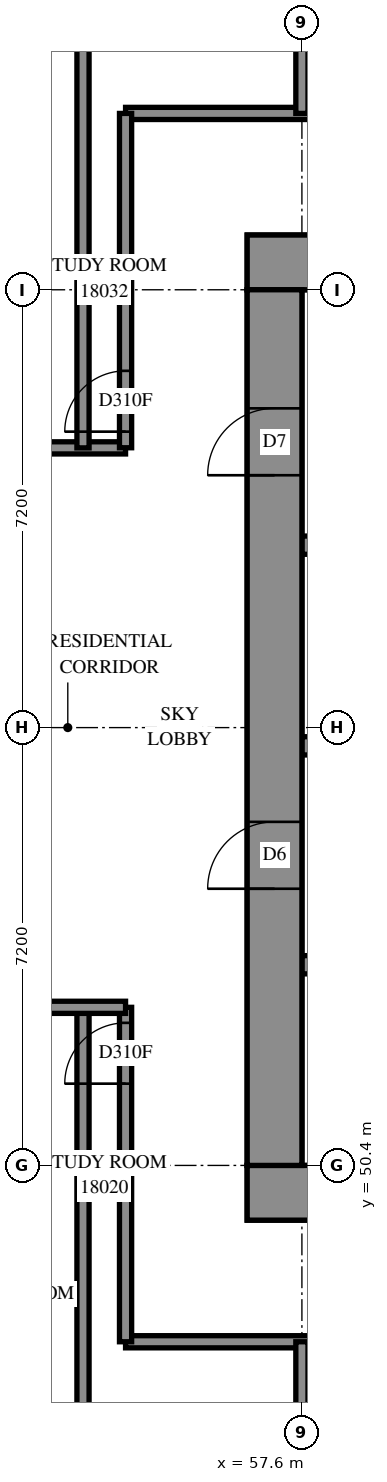
"""IFC4 building model, lengths in metres.
Left out: names, types, materials, properties, quantities, classifications, styles, units other than length and angle.
Written with IfcOpenShell. Run it as: python <this file> out.ifc"""

import sys

from ifc_helpers import new_model, si_unit, direction, frame, frame_2d, origin, place, context, subcontext, project, spatial, rectangle, extrude, element, fill, save


model = new_model("IFC4")
c1 = context("Model", 3, precision=1e-05, world=origin(), true_north=direction((0.0, 1.0)))
c2 = subcontext(c1, "Body", "Model", "MODEL_VIEW")
j1 = project(units=[si_unit("LENGTHUNIT", "METRE"), si_unit("PLANEANGLEUNIT", "RADIAN")], contexts=[c1])
p1 = place(None, origin())
s1 = spatial("IfcSite", under=j1, at=p1, CompositionType="ELEMENT")
p2 = place(p1, origin())
s2 = spatial("IfcBuilding", under=s1, at=p2, CompositionType="ELEMENT")
p3 = place(p2, frame((0.0, 0.0, 67.8)))
s3 = spatial("IfcBuildingStorey", under=s2, at=p3, CompositionType="ELEMENT", Elevation=67.8)
p4 = place(p3, frame((56.7, 49.95, -0.3), z_axis=(0.0, 0.0, 1.0), x_axis=(1.0, 0.0, 0.0)))
e1 = element("IfcWall", 1, at=p4, inside=s3, PredefinedType="SHEAR", context=c2, shape_type="SweptSolid", body=[
    extrude(rectangle(XDim=16.2, YDim=0.9, at=frame_2d((8.1, 0.0))), origin(), (0.0, 0.0, 1.0), 3.5),
])
p5 = place(p3, frame((56.7, 65.25, -0.3), z_axis=(0.0, 0.0, 1.0), x_axis=(1.0, 0.0, 0.0)))
e2 = element("IfcWall", 2, at=p5, inside=s3, PredefinedType="SHEAR", context=c2, shape_type="SweptSolid", body=[
    extrude(rectangle(XDim=16.2, YDim=0.9, at=frame_2d((8.1, 0.0))), origin(), (0.0, 0.0, 1.0), 3.5),
])
p6 = place(p5, frame((10.9, 0.0, 0.3)))
e3 = element("IfcOpeningElement", 3, at=p6, cuts=e2, PredefinedType="OPENING", context=c2, shape_type="SweptSolid", body=[
    extrude(rectangle(XDim=0.8, YDim=2.1, at=frame_2d((0.4, 1.05))), frame((0.0, 0.46, 0.0), z_axis=(0.0, -1.0, 0.0), x_axis=(1.0, 0.0, 0.0)), (0.0, 0.0, 1.0), 0.92),
])
p7 = place(p3, frame((57.15, 50.4, -0.3), z_axis=(0.0, 0.0, 1.0), x_axis=(0.0, 1.0, 0.0)))
e4 = element("IfcWall", 4, at=p7, inside=s3, PredefinedType="SHEAR", context=c2, shape_type="SweptSolid", body=[
    extrude(rectangle(XDim=14.4, YDim=0.9, at=frame_2d((7.2, 0.0))), origin(), (0.0, 0.0, 1.0), 3.5),
])
p8 = place(p7, frame((4.55, 0.0, 0.3)))
e5 = element("IfcOpeningElement", 5, at=p8, cuts=e4, PredefinedType="OPENING", context=c2, shape_type="SweptSolid", body=[
    extrude(rectangle(XDim=1.1, YDim=2.1, at=frame_2d((0.55, 1.05))), frame((0.0, 0.46, 0.0), z_axis=(0.0, -1.0, 0.0), x_axis=(1.0, 0.0, 0.0)), (0.0, 0.0, 1.0), 0.92),
])
p9 = place(p7, frame((11.35, 0.0, 0.3)))
e6 = element("IfcOpeningElement", 6, at=p9, cuts=e4, PredefinedType="OPENING", context=c2, shape_type="SweptSolid", body=[
    extrude(rectangle(XDim=1.1, YDim=2.1, at=frame_2d((0.55, 1.05))), frame((0.0, 0.46, 0.0), z_axis=(0.0, -1.0, 0.0), x_axis=(1.0, 0.0, 0.0)), (0.0, 0.0, 1.0), 0.92),
])
p10 = place(p3, frame((57.6, 53.7, 0.0), z_axis=(0.0, 0.0, 1.0), x_axis=(1.0, 0.0, 0.0)))
e7 = element("IfcWall", 7, at=p10, inside=s3, PredefinedType="SOLIDWALL", context=c2, shape_type="SweptSolid", body=[
    extrude(rectangle(XDim=14.4, YDim=0.3, at=frame_2d((7.2, 0.0))), origin(), (0.0, 0.0, 1.0), 3.9),
])
p11 = place(p10, frame((1.25, 0.0, 0.0)))
e8 = element("IfcOpeningElement", 8, at=p11, cuts=e7, PredefinedType="OPENING", context=c2, shape_type="SweptSolid", body=[
    extrude(rectangle(XDim=1.1, YDim=2.1, at=frame_2d((0.55, 1.05))), frame((0.0, 0.16, 0.0), z_axis=(0.0, -1.0, 0.0), x_axis=(1.0, 0.0, 0.0)), (0.0, 0.0, 1.0), 0.32),
])
p12 = place(p10, frame((4.85, 0.0, 0.0)))
e9 = element("IfcOpeningElement", 9, at=p12, cuts=e7, PredefinedType="OPENING", context=c2, shape_type="SweptSolid", body=[
    extrude(rectangle(XDim=1.1, YDim=2.1, at=frame_2d((0.55, 1.05))), frame((0.0, 0.16, 0.0), z_axis=(0.0, -1.0, 0.0), x_axis=(1.0, 0.0, 0.0)), (0.0, 0.0, 1.0), 0.32),
])
p13 = place(p10, frame((8.45, 0.0, 0.0)))
e10 = element("IfcOpeningElement", 10, at=p13, cuts=e7, PredefinedType="OPENING", context=c2, shape_type="SweptSolid", body=[
    extrude(rectangle(XDim=1.1, YDim=2.1, at=frame_2d((0.55, 1.05))), frame((0.0, 0.16, 0.0), z_axis=(0.0, -1.0, 0.0), x_axis=(1.0, 0.0, 0.0)), (0.0, 0.0, 1.0), 0.32),
])
p14 = place(p10, frame((12.05, 0.0, 0.0)))
e11 = element("IfcOpeningElement", 11, at=p14, cuts=e7, PredefinedType="OPENING", context=c2, shape_type="SweptSolid", body=[
    extrude(rectangle(XDim=1.1, YDim=2.1, at=frame_2d((0.55, 1.05))), frame((0.0, 0.16, 0.0), z_axis=(0.0, -1.0, 0.0), x_axis=(1.0, 0.0, 0.0)), (0.0, 0.0, 1.0), 0.32),
])
p15 = place(p3, frame((57.6, 57.3, 0.0), z_axis=(0.0, 0.0, 1.0), x_axis=(1.0, 0.0, 0.0)))
e12 = element("IfcWall", 12, at=p15, inside=s3, PredefinedType="SOLIDWALL", context=c2, shape_type="SweptSolid", body=[
    extrude(rectangle(XDim=14.4, YDim=0.3, at=frame_2d((7.2, 0.0))), origin(), (0.0, 0.0, 1.0), 3.9),
])
p16 = place(p15, frame((12.05, 0.0, 0.0)))
e13 = element("IfcOpeningElement", 13, at=p16, cuts=e12, PredefinedType="OPENING", context=c2, shape_type="SweptSolid", body=[
    extrude(rectangle(XDim=1.1, YDim=2.1, at=frame_2d((0.55, 1.05))), frame((0.0, 0.16, 0.0), z_axis=(0.0, -1.0, 0.0), x_axis=(1.0, 0.0, 0.0)), (0.0, 0.0, 1.0), 0.32),
])
p17 = place(p3, frame((57.6, 60.6, 0.0), z_axis=(0.0, 0.0, 1.0), x_axis=(1.0, 0.0, 0.0)))
e14 = element("IfcWall", 14, at=p17, inside=s3, PredefinedType="SOLIDWALL", context=c2, shape_type="SweptSolid", body=[
    extrude(rectangle(XDim=7.2, YDim=0.3, at=frame_2d((3.6, 0.0))), origin(), (0.0, 0.0, 1.0), 3.9),
])
p18 = place(p3, frame((33.4, 62.2, 0.0), z_axis=(0.0, 0.0, 1.0), x_axis=(1.0, 0.0, 0.0)))
e15 = element("IfcWall", 15, at=p18, inside=s3, PredefinedType="PARTITIONING", context=c2, shape_type="SweptSolid", body=[
    extrude(rectangle(XDim=21.3, YDim=0.2, at=frame_2d((10.65, 0.0))), origin(), (0.0, 0.0, 1.0), 3.9),
])
p19 = place(p18, frame((6.157, 0.0, 0.0)))
e16 = element("IfcOpeningElement", 16, at=p19, cuts=e15, PredefinedType="OPENING", context=c2, shape_type="SweptSolid", body=[
    extrude(rectangle(XDim=1.0, YDim=2.1, at=frame_2d((0.5, 1.05))), frame((0.0, 0.11, 0.0), z_axis=(0.0, -1.0, 0.0), x_axis=(1.0, 0.0, 0.0)), (0.0, 0.0, 1.0), 0.22),
])
p20 = place(p18, frame((13.357, 0.0, 0.0)))
e17 = element("IfcOpeningElement", 17, at=p20, cuts=e15, PredefinedType="OPENING", context=c2, shape_type="SweptSolid", body=[
    extrude(rectangle(XDim=1.0, YDim=2.1, at=frame_2d((0.5, 1.05))), frame((0.0, 0.11, 0.0), z_axis=(0.0, -1.0, 0.0), x_axis=(1.0, 0.0, 0.0)), (0.0, 0.0, 1.0), 0.22),
])
p21 = place(p18, frame((18.765, 0.0, 0.0)))
e18 = element("IfcOpeningElement", 18, at=p21, cuts=e15, PredefinedType="OPENING", context=c2, shape_type="SweptSolid", body=[
    extrude(rectangle(XDim=1.0, YDim=2.1, at=frame_2d((0.5, 1.05))), frame((0.0, 0.11, 0.0), z_axis=(0.0, -1.0, 0.0), x_axis=(1.0, 0.0, 0.0)), (0.0, 0.0, 1.0), 0.22),
])
p22 = place(p3, frame((54.7, 67.7, 0.0), z_axis=(0.0, 0.0, 1.0), x_axis=(1.0, 0.0, 0.0)))
e19 = element("IfcWall", 19, at=p22, inside=s3, PredefinedType="PARTITIONING", context=c2, shape_type="SweptSolid", body=[
    extrude(rectangle(XDim=20.2, YDim=0.2, at=frame_2d((10.1, 0.0))), origin(), (0.0, 0.0, 1.0), 3.9),
])
p23 = place(p22, frame((4.992, 0.0, 0.0)))
e20 = element("IfcOpeningElement", 20, at=p23, cuts=e19, PredefinedType="OPENING", context=c2, shape_type="SweptSolid", body=[
    extrude(rectangle(XDim=1.0, YDim=2.1, at=frame_2d((0.5, 1.05))), frame((0.0, 0.11, 0.0), z_axis=(0.0, -1.0, 0.0), x_axis=(1.0, 0.0, 0.0)), (0.0, 0.0, 1.0), 0.22),
])
p24 = place(p22, frame((7.067, 0.0, 0.0)))
e21 = element("IfcOpeningElement", 21, at=p24, cuts=e19, PredefinedType="OPENING", context=c2, shape_type="SweptSolid", body=[
    extrude(rectangle(XDim=1.0, YDim=2.1, at=frame_2d((0.5, 1.05))), frame((0.0, 0.11, 0.0), z_axis=(0.0, -1.0, 0.0), x_axis=(1.0, 0.0, 0.0)), (0.0, 0.0, 1.0), 0.22),
])
p25 = place(p22, frame((12.193, 0.0, 0.0)))
e22 = element("IfcOpeningElement", 22, at=p25, cuts=e19, PredefinedType="OPENING", context=c2, shape_type="SweptSolid", body=[
    extrude(rectangle(XDim=1.0, YDim=2.1, at=frame_2d((0.5, 1.05))), frame((0.0, 0.11, 0.0), z_axis=(0.0, -1.0, 0.0), x_axis=(1.0, 0.0, 0.0)), (0.0, 0.0, 1.0), 0.22),
])
p26 = place(p22, frame((14.268, 0.0, 0.0)))
e23 = element("IfcOpeningElement", 23, at=p26, cuts=e19, PredefinedType="OPENING", context=c2, shape_type="SweptSolid", body=[
    extrude(rectangle(XDim=1.0, YDim=2.1, at=frame_2d((0.5, 1.05))), frame((0.0, 0.11, 0.0), z_axis=(0.0, -1.0, 0.0), x_axis=(1.0, 0.0, 0.0)), (0.0, 0.0, 1.0), 0.22),
])
p27 = place(p3, frame((54.7, 47.5, 0.0), z_axis=(0.0, 0.0, 1.0), x_axis=(1.0, 0.0, 0.0)))
e24 = element("IfcWall", 24, at=p27, inside=s3, PredefinedType="PARTITIONING", context=c2, shape_type="SweptSolid", body=[
    extrude(rectangle(XDim=19.442, YDim=0.2, at=frame_2d((9.721, 0.0))), origin(), (0.0, 0.0, 1.0), 3.9),
])
p28 = place(p27, frame((4.933, 0.0, 0.0)))
e25 = element("IfcOpeningElement", 25, at=p28, cuts=e24, PredefinedType="OPENING", context=c2, shape_type="SweptSolid", body=[
    extrude(rectangle(XDim=1.0, YDim=2.1, at=frame_2d((0.5, 1.05))), frame((0.0, 0.11, 0.0), z_axis=(0.0, -1.0, 0.0), x_axis=(1.0, 0.0, 0.0)), (0.0, 0.0, 1.0), 0.22),
])
p29 = place(p27, frame((7.008, 0.0, 0.0)))
e26 = element("IfcOpeningElement", 26, at=p29, cuts=e24, PredefinedType="OPENING", context=c2, shape_type="SweptSolid", body=[
    extrude(rectangle(XDim=1.0, YDim=2.1, at=frame_2d((0.5, 1.05))), frame((0.0, 0.11, 0.0), z_axis=(0.0, -1.0, 0.0), x_axis=(1.0, 0.0, 0.0)), (0.0, 0.0, 1.0), 0.22),
])
p30 = place(p27, frame((12.133, 0.0, 0.0)))
e27 = element("IfcOpeningElement", 27, at=p30, cuts=e24, PredefinedType="OPENING", context=c2, shape_type="SweptSolid", body=[
    extrude(rectangle(XDim=1.0, YDim=2.1, at=frame_2d((0.5, 1.05))), frame((0.0, 0.11, 0.0), z_axis=(0.0, -1.0, 0.0), x_axis=(1.0, 0.0, 0.0)), (0.0, 0.0, 1.0), 0.22),
])
p31 = place(p27, frame((14.207, 0.0, 0.0)))
e28 = element("IfcOpeningElement", 28, at=p31, cuts=e24, PredefinedType="OPENING", context=c2, shape_type="SweptSolid", body=[
    extrude(rectangle(XDim=1.0, YDim=2.1, at=frame_2d((0.5, 1.05))), frame((0.0, 0.11, 0.0), z_axis=(0.0, -1.0, 0.0), x_axis=(1.0, 0.0, 0.0)), (0.0, 0.0, 1.0), 0.22),
])
for number, where, z_axis, x_axis in (
    (29, (54.0, 44.53, 0.0), (0.0, 0.0, 1.0), (0.0, 1.0, 0.0)),
    (30, (54.0, 62.2, 0.0), (0.0, 0.0, 1.0), (0.0, 1.0, 0.0)),
):
    element("IfcWall", number, at=place(p3, frame(where, z_axis=z_axis, x_axis=x_axis)), inside=s3, PredefinedType="PARTITIONING", context=c2, shape_type="SweptSolid", body=[
        extrude(rectangle(XDim=8.47, YDim=0.2, at=frame_2d((4.235, 0.0))), origin(), (0.0, 0.0, 1.0), 3.9),
    ])
p32 = place(p3, frame((54.7, 47.5, 0.0), z_axis=(0.0, 0.0, 1.0), x_axis=(0.0, 1.0, 0.0)))
e31 = element("IfcWall", 31, at=p32, inside=s3, PredefinedType="PARTITIONING", context=c2, shape_type="SweptSolid", body=[
    extrude(rectangle(XDim=5.5, YDim=0.2, at=frame_2d((2.75, 0.0))), origin(), (0.0, 0.0, 1.0), 3.9),
])
p33 = place(p32, frame((4.245, 0.0, 0.0)))
e32 = element("IfcOpeningElement", 32, at=p33, cuts=e31, PredefinedType="OPENING", context=c2, shape_type="SweptSolid", body=[
    extrude(rectangle(XDim=1.0, YDim=2.1, at=frame_2d((0.5, 1.05))), frame((0.0, 0.11, 0.0), z_axis=(0.0, -1.0, 0.0), x_axis=(1.0, 0.0, 0.0)), (0.0, 0.0, 1.0), 0.22),
])
p34 = place(p3, frame((54.7, 62.202, 0.0), z_axis=(0.0, 0.0, 1.0), x_axis=(0.0, 1.0, 0.0)))
e33 = element("IfcWall", 33, at=p34, inside=s3, PredefinedType="PARTITIONING", context=c2, shape_type="SweptSolid", body=[
    extrude(rectangle(XDim=5.498, YDim=0.2, at=frame_2d((2.749, 0.0))), origin(), (0.0, 0.0, 1.0), 3.9),
])
p35 = place(p34, frame((0.265, 0.0, 0.0)))
e34 = element("IfcOpeningElement", 34, at=p35, cuts=e33, PredefinedType="OPENING", context=c2, shape_type="SweptSolid", body=[
    extrude(rectangle(XDim=1.0, YDim=2.1, at=frame_2d((0.5, 1.05))), frame((0.0, 0.11, 0.0), z_axis=(0.0, -1.0, 0.0), x_axis=(1.0, 0.0, 0.0)), (0.0, 0.0, 1.0), 0.22),
])
p36 = place(p3, frame((50.4, 53.0, 0.0), z_axis=(0.0, 0.0, 1.0), x_axis=(1.0, 0.0, 0.0)))
e35 = element("IfcWall", 35, at=p36, inside=s3, PredefinedType="PARTITIONING", context=c2, shape_type="SweptSolid", body=[
    extrude(rectangle(XDim=4.3, YDim=0.2, at=frame_2d((2.15, 0.0))), origin(), (0.0, 0.0, 1.0), 3.9),
])
p37 = place(p36, frame((2.033, 0.0, 0.0)))
e36 = element("IfcOpeningElement", 36, at=p37, cuts=e35, PredefinedType="OPENING", context=c2, shape_type="SweptSolid", body=[
    extrude(rectangle(XDim=1.0, YDim=2.1, at=frame_2d((0.5, 1.05))), frame((0.0, 0.11, 0.0), z_axis=(0.0, -1.0, 0.0), x_axis=(1.0, 0.0, 0.0)), (0.0, 0.0, 1.0), 0.22),
])
for number, where, z_axis, x_axis in (
    (37, (57.6, 44.53, 0.0), (0.0, 0.0, 1.0), (0.0, 1.0, 0.0)),
    (38, (57.6, 67.7, 0.0), (0.0, 0.0, 1.0), (0.0, 1.0, 0.0)),
):
    element("IfcWall", number, at=place(p3, frame(where, z_axis=z_axis, x_axis=x_axis)), inside=s3, PredefinedType="PARTITIONING", context=c2, shape_type="SweptSolid", body=[
        extrude(rectangle(XDim=2.97, YDim=0.2, at=frame_2d((1.485, 0.0))), origin(), (0.0, 0.0, 1.0), 3.9),
    ])
p38 = place(p8, origin())
e39 = element("IfcDoor", 39, at=p38, inside=s3, OperationType="DOUBLE_DOOR_SINGLE_SWING", PredefinedType="DOOR", context=c2, shape_type="SweptSolid", body=[
    extrude(rectangle(XDim=1.1, YDim=2.1, at=frame_2d((0.55, 1.05))), frame((0.0, 0.025, 0.0), z_axis=(0.0, -1.0, 0.0), x_axis=(1.0, 0.0, 0.0)), (0.0, 0.0, 1.0), 0.05),
])
fill(e5, e39)
p39 = place(p9, origin())
e40 = element("IfcDoor", 40, at=p39, inside=s3, OperationType="SINGLE_SWING_LEFT", PredefinedType="DOOR", context=c2, shape_type="SweptSolid", body=[
    extrude(rectangle(XDim=1.1, YDim=2.1, at=frame_2d((0.55, 1.05))), frame((0.0, 0.025, 0.0), z_axis=(0.0, -1.0, 0.0), x_axis=(1.0, 0.0, 0.0)), (0.0, 0.0, 1.0), 0.05),
])
fill(e6, e40)
p40 = place(p33, origin())
e41 = element("IfcDoor", 41, at=p40, inside=s3, OperationType="SINGLE_SWING_RIGHT", PredefinedType="DOOR", context=c2, shape_type="SweptSolid", body=[
    extrude(rectangle(XDim=1.0, YDim=2.1, at=frame_2d((0.5, 1.05))), frame((0.0, 0.025, 0.0), z_axis=(0.0, -1.0, 0.0), x_axis=(1.0, 0.0, 0.0)), (0.0, 0.0, 1.0), 0.05),
])
fill(e32, e41)
p41 = place(p35, origin())
e42 = element("IfcDoor", 42, at=p41, inside=s3, OperationType="SINGLE_SWING_LEFT", PredefinedType="DOOR", context=c2, shape_type="SweptSolid", body=[
    extrude(rectangle(XDim=1.0, YDim=2.1, at=frame_2d((0.5, 1.05))), frame((0.0, 0.025, 0.0), z_axis=(0.0, -1.0, 0.0), x_axis=(1.0, 0.0, 0.0)), (0.0, 0.0, 1.0), 0.05),
])
fill(e34, e42)
save(model, sys.argv[1])
